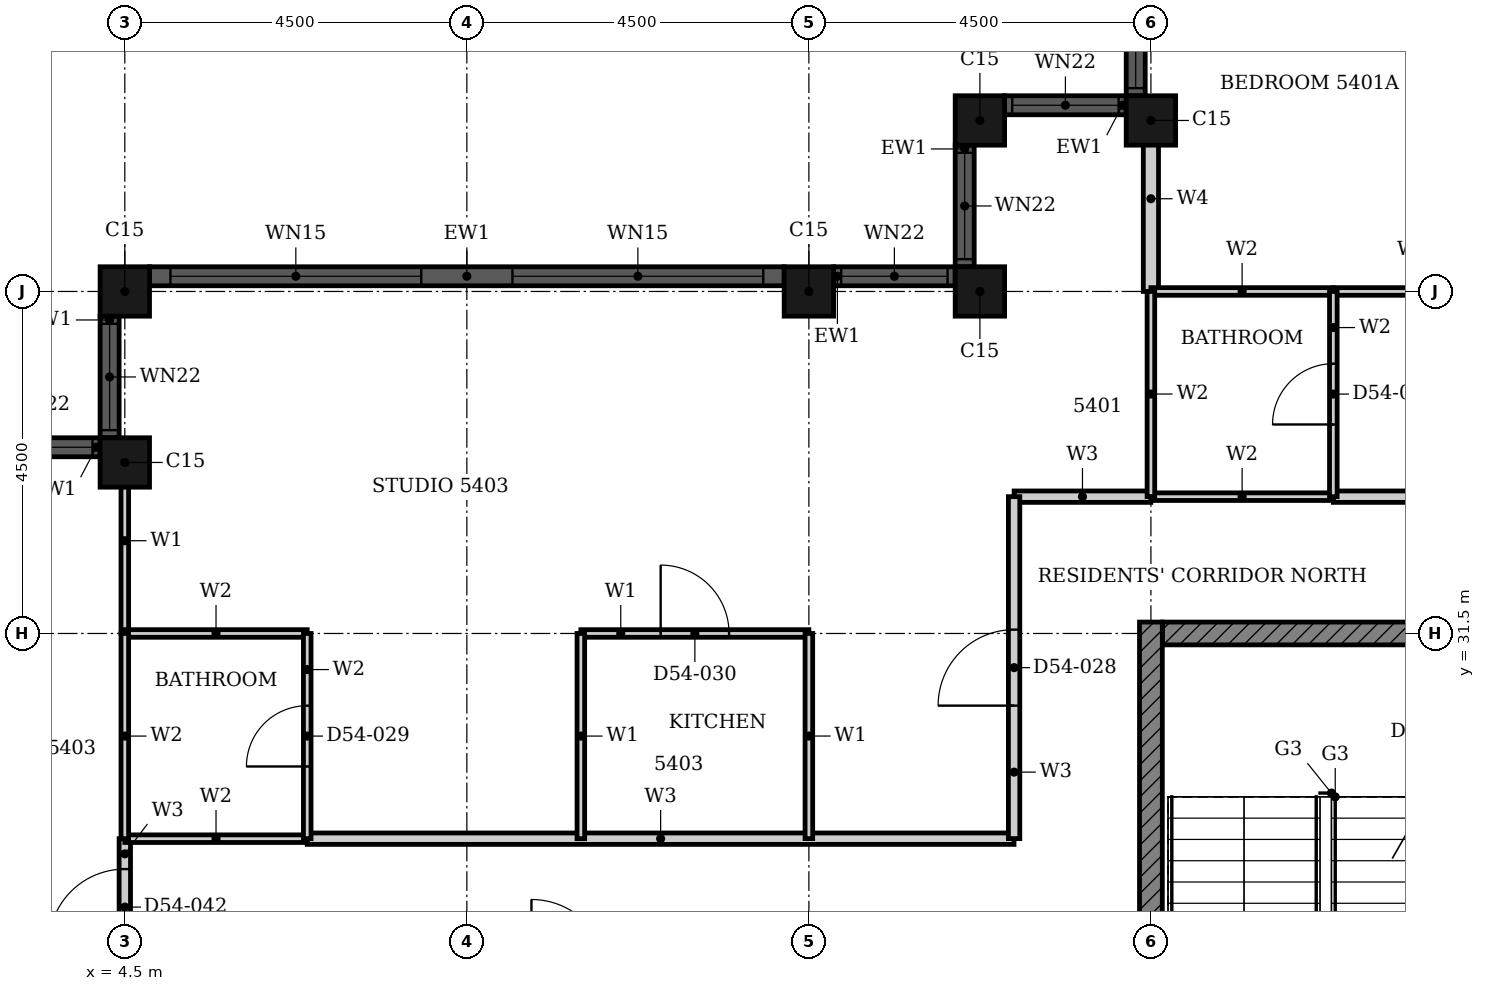
"""IFC4 building model, lengths in metres.
Left out: names, types, materials, properties, quantities, classifications, styles, units other than length and angle.
Written with IfcOpenShell. Run it as: python <this file> out.ifc"""

import sys

from ifc_helpers import new_model, si_unit, direction, frame, frame_2d, origin, origin_2d, place, context, subcontext, project, spatial, rectangle, hollow_rectangle, extrude, element, fill, save


model = new_model("IFC4")
c1 = context("Model", 3, precision=1e-05, world=origin(), true_north=direction((0.0, 1.0)))
c2 = subcontext(c1, "Body", "Model", "MODEL_VIEW")
j1 = project(units=[si_unit("LENGTHUNIT", "METRE"), si_unit("PLANEANGLEUNIT", "RADIAN")], contexts=[c1])
p1 = place(None, origin())
s1 = spatial("IfcSite", under=j1, at=p1, CompositionType="ELEMENT")
p2 = place(p1, origin())
s2 = spatial("IfcBuilding", under=s1, at=p2, CompositionType="ELEMENT")
p3 = place(p2, frame((0.0, 0.0, 214.6)))
s3 = spatial("IfcBuildingStorey", under=s2, at=p3, CompositionType="ELEMENT", Elevation=214.6)
for number, where, z_axis, x_axis in (
    (1, (18.0, 38.25, 0.0), (0.0, 0.0, 1.0), (1.0, 0.0, 0.0)),
    (2, (15.75, 38.25, 0.0), (0.0, 0.0, 1.0), (1.0, 0.0, 0.0)),
    (3, (15.75, 36.0, 0.0), (0.0, 0.0, 1.0), (1.0, 0.0, 0.0)),
    (4, (13.5, 36.0, 0.0), (0.0, 0.0, 1.0), (1.0, 0.0, 0.0)),
    (5, (4.5, 36.0, 0.0), (0.0, 0.0, 1.0), (1.0, 0.0, 0.0)),
    (6, (4.5, 33.75, 0.0), (0.0, 0.0, 1.0), (1.0, 0.0, 0.0)),
):
    element("IfcColumn", number, at=place(p3, frame(where, z_axis=z_axis, x_axis=x_axis)), inside=s3, PredefinedType="COLUMN", context=c2, shape_type="SweptSolid", body=[
        extrude(hollow_rectangle(XDim=0.65, YDim=0.65, WallThickness=0.021, at=origin_2d()), origin(), (0.0, 0.0, 1.0), 3.7),
    ])
p4 = place(p3, frame((17.8, 40.175, 0.0), z_axis=(0.0, 0.0, 1.0), x_axis=(0.0, -1.0, 0.0)))
e7 = element("IfcWall", 7, at=p4, inside=s3, PredefinedType="SOLIDWALL", context=c2, shape_type="SweptSolid", body=[
    extrude(rectangle(XDim=1.6, YDim=0.25, at=frame_2d((0.8, 0.0))), origin(), (0.0, 0.0, 1.0), 3.7),
])
p5 = place(p4, frame((0.1, 0.0, 0.9)))
e8 = element("IfcOpeningElement", 8, at=p5, cuts=e7, PredefinedType="OPENING", context=c2, shape_type="SweptSolid", body=[
    extrude(rectangle(XDim=1.4, YDim=1.85, at=frame_2d((0.7, 0.925))), frame((0.0, 0.135, 0.0), z_axis=(0.0, -1.0, 0.0), x_axis=(1.0, 0.0, 0.0)), (0.0, 0.0, 1.0), 0.27),
])
p6 = place(p3, frame((17.675, 38.45, 0.0), z_axis=(0.0, 0.0, 1.0), x_axis=(-1.0, 0.0, 0.0)))
e9 = element("IfcWall", 9, at=p6, inside=s3, PredefinedType="SOLIDWALL", context=c2, shape_type="SweptSolid", body=[
    extrude(rectangle(XDim=1.6, YDim=0.25, at=frame_2d((0.8, 0.0))), origin(), (0.0, 0.0, 1.0), 3.7),
])
p7 = place(p6, frame((0.1, 0.0, 0.9)))
e10 = element("IfcOpeningElement", 10, at=p7, cuts=e9, PredefinedType="OPENING", context=c2, shape_type="SweptSolid", body=[
    extrude(rectangle(XDim=1.4, YDim=1.85, at=frame_2d((0.7, 0.925))), frame((0.0, 0.135, 0.0), z_axis=(0.0, -1.0, 0.0), x_axis=(1.0, 0.0, 0.0)), (0.0, 0.0, 1.0), 0.27),
])
p8 = place(p3, frame((15.55, 37.925, 0.0), z_axis=(0.0, 0.0, 1.0), x_axis=(0.0, -1.0, 0.0)))
e11 = element("IfcWall", 11, at=p8, inside=s3, PredefinedType="SOLIDWALL", context=c2, shape_type="SweptSolid", body=[
    extrude(rectangle(XDim=1.6, YDim=0.25, at=frame_2d((0.8, 0.0))), origin(), (0.0, 0.0, 1.0), 3.7),
])
p9 = place(p8, frame((0.1, 0.0, 0.9)))
e12 = element("IfcOpeningElement", 12, at=p9, cuts=e11, PredefinedType="OPENING", context=c2, shape_type="SweptSolid", body=[
    extrude(rectangle(XDim=1.4, YDim=1.85, at=frame_2d((0.7, 0.925))), frame((0.0, 0.135, 0.0), z_axis=(0.0, -1.0, 0.0), x_axis=(1.0, 0.0, 0.0)), (0.0, 0.0, 1.0), 0.27),
])
p10 = place(p3, frame((15.425, 36.2, 0.0), z_axis=(0.0, 0.0, 1.0), x_axis=(-1.0, 0.0, 0.0)))
e13 = element("IfcWall", 13, at=p10, inside=s3, PredefinedType="SOLIDWALL", context=c2, shape_type="SweptSolid", body=[
    extrude(rectangle(XDim=1.6, YDim=0.25, at=frame_2d((0.8, 0.0))), origin(), (0.0, 0.0, 1.0), 3.7),
])
p11 = place(p10, frame((0.1, 0.0, 0.9)))
e14 = element("IfcOpeningElement", 14, at=p11, cuts=e13, PredefinedType="OPENING", context=c2, shape_type="SweptSolid", body=[
    extrude(rectangle(XDim=1.4, YDim=1.85, at=frame_2d((0.7, 0.925))), frame((0.0, 0.135, 0.0), z_axis=(0.0, -1.0, 0.0), x_axis=(1.0, 0.0, 0.0)), (0.0, 0.0, 1.0), 0.27),
])
p12 = place(p3, frame((13.175, 36.2, 0.0), z_axis=(0.0, 0.0, 1.0), x_axis=(-1.0, 0.0, 0.0)))
e15 = element("IfcWall", 15, at=p12, inside=s3, PredefinedType="SOLIDWALL", context=c2, shape_type="SweptSolid", body=[
    extrude(rectangle(XDim=8.35, YDim=0.25, at=frame_2d((4.175, 0.0))), origin(), (0.0, 0.0, 1.0), 3.7),
])
p13 = place(p12, frame((0.275, 0.0, 0.45)))
e16 = element("IfcOpeningElement", 16, at=p13, cuts=e15, PredefinedType="OPENING", context=c2, shape_type="SweptSolid", body=[
    extrude(rectangle(XDim=3.3, YDim=2.3, at=frame_2d((1.65, 1.15))), frame((0.0, 0.135, 0.0), z_axis=(0.0, -1.0, 0.0), x_axis=(1.0, 0.0, 0.0)), (0.0, 0.0, 1.0), 0.27),
])
p14 = place(p12, frame((4.775, 0.0, 0.45)))
e17 = element("IfcOpeningElement", 17, at=p14, cuts=e15, PredefinedType="OPENING", context=c2, shape_type="SweptSolid", body=[
    extrude(rectangle(XDim=3.3, YDim=2.3, at=frame_2d((1.65, 1.15))), frame((0.0, 0.135, 0.0), z_axis=(0.0, -1.0, 0.0), x_axis=(1.0, 0.0, 0.0)), (0.0, 0.0, 1.0), 0.27),
])
p15 = place(p3, frame((4.3, 35.675, 0.0), z_axis=(0.0, 0.0, 1.0), x_axis=(0.0, -1.0, 0.0)))
e18 = element("IfcWall", 18, at=p15, inside=s3, PredefinedType="SOLIDWALL", context=c2, shape_type="SweptSolid", body=[
    extrude(rectangle(XDim=1.6, YDim=0.25, at=frame_2d((0.8, 0.0))), origin(), (0.0, 0.0, 1.0), 3.7),
])
p16 = place(p15, frame((0.1, 0.0, 0.9)))
e19 = element("IfcOpeningElement", 19, at=p16, cuts=e18, PredefinedType="OPENING", context=c2, shape_type="SweptSolid", body=[
    extrude(rectangle(XDim=1.4, YDim=1.85, at=frame_2d((0.7, 0.925))), frame((0.0, 0.135, 0.0), z_axis=(0.0, -1.0, 0.0), x_axis=(1.0, 0.0, 0.0)), (0.0, 0.0, 1.0), 0.27),
])
p17 = place(p3, frame((4.175, 33.95, 0.0), z_axis=(0.0, 0.0, 1.0), x_axis=(-1.0, 0.0, 0.0)))
e20 = element("IfcWall", 20, at=p17, inside=s3, PredefinedType="SOLIDWALL", context=c2, shape_type="SweptSolid", body=[
    extrude(rectangle(XDim=1.6, YDim=0.25, at=frame_2d((0.8, 0.0))), origin(), (0.0, 0.0, 1.0), 3.7),
])
p18 = place(p17, frame((0.1, 0.0, 0.9)))
e21 = element("IfcOpeningElement", 21, at=p18, cuts=e20, PredefinedType="OPENING", context=c2, shape_type="SweptSolid", body=[
    extrude(rectangle(XDim=1.4, YDim=1.85, at=frame_2d((0.7, 0.925))), frame((0.0, 0.135, 0.0), z_axis=(0.0, -1.0, 0.0), x_axis=(1.0, 0.0, 0.0)), (0.0, 0.0, 1.0), 0.27),
])
p19 = place(p3, frame((18.15, 31.5, 0.0), z_axis=(0.0, 0.0, 1.0), x_axis=(1.0, 0.0, 0.0)))
e22 = element("IfcWall", 22, at=p19, inside=s3, PredefinedType="SHEAR", context=c2, shape_type="SweptSolid", body=[
    extrude(rectangle(XDim=9.368, YDim=0.3, at=frame_2d((4.684, 0.0))), origin(), (0.0, 0.0, 1.0), 3.4),
])
p20 = place(p19, frame((4.736, 0.0, 0.0)))
e23 = element("IfcOpeningElement", 23, at=p20, cuts=e22, PredefinedType="OPENING", context=c2, shape_type="SweptSolid", body=[
    extrude(rectangle(XDim=1.8, YDim=2.1, at=frame_2d((0.9, 1.05))), frame((0.0, 0.16, 0.0), z_axis=(0.0, -1.0, 0.0), x_axis=(1.0, 0.0, 0.0)), (0.0, 0.0, 1.0), 0.32),
])
p21 = place(p3, frame((18.0, 22.35, 0.0), z_axis=(0.0, 0.0, 1.0), x_axis=(0.0, 1.0, 0.0)))
e24 = element("IfcWall", 24, at=p21, inside=s3, PredefinedType="SHEAR", context=c2, shape_type="SweptSolid", body=[
    extrude(rectangle(XDim=9.3, YDim=0.3, at=frame_2d((4.65, 0.0))), origin(), (0.0, 0.0, 1.0), 3.4),
])
p22 = place(p3, frame((6.9, 28.8, 0.0), z_axis=(0.0, 0.0, 1.0), x_axis=(1.0, 0.0, 0.0)))
e25 = element("IfcWall", 25, at=p22, inside=s3, PredefinedType="PARTITIONING", context=c2, shape_type="SweptSolid", body=[
    extrude(rectangle(XDim=9.299, YDim=0.15, at=frame_2d((4.649, 0.0))), origin(), (0.0, 0.0, 1.0), 3.4),
])
p23 = place(p3, frame((20.4, 33.3, 0.0), z_axis=(0.0, 0.0, 1.0), x_axis=(1.0, 0.0, 0.0)))
e26 = element("IfcWall", 26, at=p23, inside=s3, PredefinedType="PARTITIONING", context=c2, shape_type="SweptSolid", body=[
    extrude(rectangle(XDim=11.1, YDim=0.15, at=frame_2d((5.55, 0.0))), origin(), (0.0, 0.0, 1.0), 3.4),
])
p24 = place(p23, frame((1.6, 0.0, 0.0)))
e27 = element("IfcOpeningElement", 27, at=p24, cuts=e26, PredefinedType="OPENING", context=c2, shape_type="SweptSolid", body=[
    extrude(rectangle(XDim=1.0, YDim=2.2, at=frame_2d((0.5, 1.1))), frame((0.0, 0.085, 0.0), z_axis=(0.0, -1.0, 0.0), x_axis=(1.0, 0.0, 0.0)), (0.0, 0.0, 1.0), 0.17),
])
p25 = place(p3, frame((16.2, 33.3, 0.0), z_axis=(0.0, 0.0, 1.0), x_axis=(1.0, 0.0, 0.0)))
e28 = element("IfcWall", 28, at=p25, inside=s3, PredefinedType="PARTITIONING", context=c2, shape_type="SweptSolid", body=[
    extrude(rectangle(XDim=1.799, YDim=0.15, at=frame_2d((0.899, 0.0))), origin(), (0.0, 0.0, 1.0), 3.4),
])
p26 = place(p3, frame((16.2, 28.801, 0.0), z_axis=(0.0, 0.0, 1.0), x_axis=(0.0, 1.0, 0.0)))
e29 = element("IfcWall", 29, at=p26, inside=s3, PredefinedType="PARTITIONING", context=c2, shape_type="SweptSolid", body=[
    extrude(rectangle(XDim=4.499, YDim=0.15, at=frame_2d((2.25, 0.0))), origin(), (0.0, 0.0, 1.0), 3.4),
])
p27 = place(p26, frame((1.75, 0.0, 0.0)))
e30 = element("IfcOpeningElement", 30, at=p27, cuts=e29, PredefinedType="OPENING", context=c2, shape_type="SweptSolid", body=[
    extrude(rectangle(XDim=1.0, YDim=2.2, at=frame_2d((0.5, 1.1))), frame((0.0, 0.085, 0.0), z_axis=(0.0, -1.0, 0.0), x_axis=(1.0, 0.0, 0.0)), (0.0, 0.0, 1.0), 0.17),
])
p28 = place(p3, frame((4.5, 27.0, 0.0), z_axis=(0.0, 0.0, 1.0), x_axis=(0.0, 1.0, 0.0)))
e31 = element("IfcWall", 31, at=p28, inside=s3, PredefinedType="PARTITIONING", context=c2, shape_type="SweptSolid", body=[
    extrude(rectangle(XDim=1.8, YDim=0.15, at=frame_2d((0.9, 0.0))), origin(), (0.0, 0.0, 1.0), 3.4),
])
p29 = place(p28, frame((0.4, 0.0, 0.0)))
e32 = element("IfcOpeningElement", 32, at=p29, cuts=e31, PredefinedType="OPENING", context=c2, shape_type="SweptSolid", body=[
    extrude(rectangle(XDim=1.0, YDim=2.1, at=frame_2d((0.5, 1.05))), frame((0.0, 0.085, 0.0), z_axis=(0.0, -1.0, 0.0), x_axis=(1.0, 0.0, 0.0)), (0.0, 0.0, 1.0), 0.17),
])
p30 = place(p3, frame((10.5, 31.5, 0.0), z_axis=(0.0, 0.0, 1.0), x_axis=(1.0, 0.0, 0.0)))
e33 = element("IfcWall", 33, at=p30, inside=s3, PredefinedType="PARTITIONING", context=c2, shape_type="SweptSolid", body=[
    extrude(rectangle(XDim=3.0, YDim=0.1, at=frame_2d((1.5, 0.0))), origin(), (0.0, 0.0, 1.0), 2.68),
])
p31 = place(p30, frame((1.05, 0.0, 0.0)))
e34 = element("IfcOpeningElement", 34, at=p31, cuts=e33, PredefinedType="OPENING", context=c2, shape_type="SweptSolid", body=[
    extrude(rectangle(XDim=0.9, YDim=2.1, at=frame_2d((0.45, 1.05))), frame((0.0, 0.06, 0.0), z_axis=(0.0, -1.0, 0.0), x_axis=(1.0, 0.0, 0.0)), (0.0, 0.0, 1.0), 0.12),
])
p32 = place(p3, frame((20.4, 36.0, 0.0), z_axis=(0.0, 0.0, 1.0), x_axis=(1.0, 0.0, 0.0)))
e35 = element("IfcWall", 35, at=p32, inside=s3, PredefinedType="PARTITIONING", context=c2, shape_type="SweptSolid", body=[
    extrude(rectangle(XDim=2.1, YDim=0.1, at=frame_2d((1.05, 0.0))), origin(), (0.0, 0.0, 1.0), 3.4),
])
p33 = place(p3, frame((10.5, 28.8, 0.0), z_axis=(0.0, 0.0, 1.0), x_axis=(0.0, 1.0, 0.0)))
e36 = element("IfcWall", 36, at=p33, inside=s3, PredefinedType="PARTITIONING", context=c2, shape_type="SweptSolid", body=[
    extrude(rectangle(XDim=2.7, YDim=0.1, at=frame_2d((1.35, 0.0))), origin(), (0.0, 0.0, 1.0), 3.4),
])
p34 = place(p3, frame((13.5, 28.801, 0.0), z_axis=(0.0, 0.0, 1.0), x_axis=(0.0, 1.0, 0.0)))
e37 = element("IfcWall", 37, at=p34, inside=s3, PredefinedType="PARTITIONING", context=c2, shape_type="SweptSolid", body=[
    extrude(rectangle(XDim=2.699, YDim=0.1, at=frame_2d((1.35, 0.0))), origin(), (0.0, 0.0, 1.0), 2.48),
])
p35 = place(p3, frame((4.5, 31.501, 0.0), z_axis=(0.0, 0.0, 1.0), x_axis=(0.0, 1.0, 0.0)))
e38 = element("IfcWall", 38, at=p35, inside=s3, PredefinedType="PARTITIONING", context=c2, shape_type="SweptSolid", body=[
    extrude(rectangle(XDim=2.439, YDim=0.1, at=frame_2d((1.219, 0.0))), origin(), (0.0, 0.0, 1.0), 3.4),
])
p36 = place(p3, frame((18.0, 36.0, 0.0), z_axis=(0.0, 0.0, 1.0), x_axis=(0.0, 1.0, 0.0)))
e39 = element("IfcWall", 39, at=p36, inside=s3, PredefinedType="PARTITIONING", context=c2, shape_type="SweptSolid", body=[
    extrude(rectangle(XDim=2.44, YDim=0.2, at=frame_2d((1.22, 0.0))), origin(), (0.0, 0.0, 1.0), 3.4),
])
p37 = place(p3, frame((4.5, 28.8, 0.0), z_axis=(0.0, 0.0, 1.0), x_axis=(1.0, 0.0, 0.0)))
e40 = element("IfcWall", 40, at=p37, inside=s3, PredefinedType="PARTITIONING", context=c2, shape_type="SweptSolid", body=[
    extrude(rectangle(XDim=2.4, YDim=0.1, at=frame_2d((1.2, 0.0))), origin(), (0.0, 0.0, 1.0), 3.4),
])
p38 = place(p3, frame((4.5, 31.5, 0.0), z_axis=(0.0, 0.0, 1.0), x_axis=(1.0, 0.0, 0.0)))
e41 = element("IfcWall", 41, at=p38, inside=s3, PredefinedType="PARTITIONING", context=c2, shape_type="SweptSolid", body=[
    extrude(rectangle(XDim=2.4, YDim=0.1, at=frame_2d((1.2, 0.0))), origin(), (0.0, 0.0, 1.0), 2.68),
])
for number, where, z_axis, x_axis in (
    (42, (18.0, 33.3, 0.0), (0.0, 0.0, 1.0), (1.0, 0.0, 0.0)),
    (43, (18.0, 36.0, 0.0), (0.0, 0.0, 1.0), (1.0, 0.0, 0.0)),
):
    element("IfcWall", number, at=place(p3, frame(where, z_axis=z_axis, x_axis=x_axis)), inside=s3, PredefinedType="PARTITIONING", context=c2, shape_type="SweptSolid", body=[
        extrude(rectangle(XDim=2.4, YDim=0.1, at=frame_2d((1.2, 0.0))), origin(), (0.0, 0.0, 1.0), 3.4),
    ])
p39 = place(p3, frame((18.0, 33.301, 0.0), z_axis=(0.0, 0.0, 1.0), x_axis=(0.0, 1.0, 0.0)))
e44 = element("IfcWall", 44, at=p39, inside=s3, PredefinedType="PARTITIONING", context=c2, shape_type="SweptSolid", body=[
    extrude(rectangle(XDim=2.699, YDim=0.1, at=frame_2d((1.35, 0.0))), origin(), (0.0, 0.0, 1.0), 3.4),
])
p40 = place(p3, frame((20.4, 33.3, 0.0), z_axis=(0.0, 0.0, 1.0), x_axis=(0.0, 1.0, 0.0)))
e45 = element("IfcWall", 45, at=p40, inside=s3, PredefinedType="PARTITIONING", context=c2, shape_type="SweptSolid", body=[
    extrude(rectangle(XDim=2.7, YDim=0.1, at=frame_2d((1.35, 0.0))), origin(), (0.0, 0.0, 1.0), 3.4),
])
p41 = place(p40, frame((0.95, 0.0, 0.0)))
e46 = element("IfcOpeningElement", 46, at=p41, cuts=e45, PredefinedType="OPENING", context=c2, shape_type="SweptSolid", body=[
    extrude(rectangle(XDim=0.8, YDim=2.1, at=frame_2d((0.4, 1.05))), frame((0.0, 0.06, 0.0), z_axis=(0.0, -1.0, 0.0), x_axis=(1.0, 0.0, 0.0)), (0.0, 0.0, 1.0), 0.12),
])
p42 = place(p3, frame((4.5, 28.8, 0.0), z_axis=(0.0, 0.0, 1.0), x_axis=(0.0, 1.0, 0.0)))
e47 = element("IfcWall", 47, at=p42, inside=s3, PredefinedType="PARTITIONING", context=c2, shape_type="SweptSolid", body=[
    extrude(rectangle(XDim=2.7, YDim=0.1, at=frame_2d((1.35, 0.0))), origin(), (0.0, 0.0, 1.0), 3.4),
])
p43 = place(p3, frame((6.9, 28.8, 0.0), z_axis=(0.0, 0.0, 1.0), x_axis=(0.0, 1.0, 0.0)))
e48 = element("IfcWall", 48, at=p43, inside=s3, PredefinedType="PARTITIONING", context=c2, shape_type="SweptSolid", body=[
    extrude(rectangle(XDim=2.7, YDim=0.1, at=frame_2d((1.35, 0.0))), origin(), (0.0, 0.0, 1.0), 3.4),
])
p44 = place(p43, frame((0.95, 0.0, 0.0)))
e49 = element("IfcOpeningElement", 49, at=p44, cuts=e48, PredefinedType="OPENING", context=c2, shape_type="SweptSolid", body=[
    extrude(rectangle(XDim=0.8, YDim=2.1, at=frame_2d((0.4, 1.05))), frame((0.0, 0.06, 0.0), z_axis=(0.0, -1.0, 0.0), x_axis=(1.0, 0.0, 0.0)), (0.0, 0.0, 1.0), 0.12),
])
p45 = place(p5, origin())
e50 = element("IfcWindow", 50, at=p45, inside=s3, PartitioningType="SINGLE_PANEL", PredefinedType="WINDOW", context=c2, shape_type="SweptSolid", body=[
    extrude(rectangle(XDim=1.4, YDim=1.85, at=frame_2d((0.7, 0.925))), frame((0.0, 0.03, 0.0), z_axis=(0.0, -1.0, 0.0), x_axis=(1.0, 0.0, 0.0)), (0.0, 0.0, 1.0), 0.06),
])
fill(e8, e50)
p46 = place(p7, origin())
e51 = element("IfcWindow", 51, at=p46, inside=s3, PartitioningType="SINGLE_PANEL", PredefinedType="WINDOW", context=c2, shape_type="SweptSolid", body=[
    extrude(rectangle(XDim=1.4, YDim=1.85, at=frame_2d((0.7, 0.925))), frame((0.0, 0.03, 0.0), z_axis=(0.0, -1.0, 0.0), x_axis=(1.0, 0.0, 0.0)), (0.0, 0.0, 1.0), 0.06),
])
fill(e10, e51)
p47 = place(p9, origin())
e52 = element("IfcWindow", 52, at=p47, inside=s3, PartitioningType="SINGLE_PANEL", PredefinedType="WINDOW", context=c2, shape_type="SweptSolid", body=[
    extrude(rectangle(XDim=1.4, YDim=1.85, at=frame_2d((0.7, 0.925))), frame((0.0, 0.03, 0.0), z_axis=(0.0, -1.0, 0.0), x_axis=(1.0, 0.0, 0.0)), (0.0, 0.0, 1.0), 0.06),
])
fill(e12, e52)
p48 = place(p11, origin())
e53 = element("IfcWindow", 53, at=p48, inside=s3, PartitioningType="SINGLE_PANEL", PredefinedType="WINDOW", context=c2, shape_type="SweptSolid", body=[
    extrude(rectangle(XDim=1.4, YDim=1.85, at=frame_2d((0.7, 0.925))), frame((0.0, 0.03, 0.0), z_axis=(0.0, -1.0, 0.0), x_axis=(1.0, 0.0, 0.0)), (0.0, 0.0, 1.0), 0.06),
])
fill(e14, e53)
p49 = place(p13, origin())
e54 = element("IfcWindow", 54, at=p49, inside=s3, PartitioningType="SINGLE_PANEL", PredefinedType="WINDOW", context=c2, shape_type="SweptSolid", body=[
    extrude(rectangle(XDim=3.3, YDim=2.3, at=frame_2d((1.65, 1.15))), frame((0.0, 0.03, 0.0), z_axis=(0.0, -1.0, 0.0), x_axis=(1.0, 0.0, 0.0)), (0.0, 0.0, 1.0), 0.06),
])
fill(e16, e54)
p50 = place(p14, origin())
e55 = element("IfcWindow", 55, at=p50, inside=s3, PartitioningType="SINGLE_PANEL", PredefinedType="WINDOW", context=c2, shape_type="SweptSolid", body=[
    extrude(rectangle(XDim=3.3, YDim=2.3, at=frame_2d((1.65, 1.15))), frame((0.0, 0.03, 0.0), z_axis=(0.0, -1.0, 0.0), x_axis=(1.0, 0.0, 0.0)), (0.0, 0.0, 1.0), 0.06),
])
fill(e17, e55)
p51 = place(p16, origin())
e56 = element("IfcWindow", 56, at=p51, inside=s3, PartitioningType="SINGLE_PANEL", PredefinedType="WINDOW", context=c2, shape_type="SweptSolid", body=[
    extrude(rectangle(XDim=1.4, YDim=1.85, at=frame_2d((0.7, 0.925))), frame((0.0, 0.03, 0.0), z_axis=(0.0, -1.0, 0.0), x_axis=(1.0, 0.0, 0.0)), (0.0, 0.0, 1.0), 0.06),
])
fill(e19, e56)
p52 = place(p18, origin())
e57 = element("IfcWindow", 57, at=p52, inside=s3, PartitioningType="SINGLE_PANEL", PredefinedType="WINDOW", context=c2, shape_type="SweptSolid", body=[
    extrude(rectangle(XDim=1.4, YDim=1.85, at=frame_2d((0.7, 0.925))), frame((0.0, 0.03, 0.0), z_axis=(0.0, -1.0, 0.0), x_axis=(1.0, 0.0, 0.0)), (0.0, 0.0, 1.0), 0.06),
])
fill(e21, e57)
p53 = place(p41, origin())
e58 = element("IfcDoor", 58, at=p53, inside=s3, OperationType="SINGLE_SWING_RIGHT", PredefinedType="DOOR", context=c2, shape_type="SweptSolid", body=[
    extrude(rectangle(XDim=0.8, YDim=2.1, at=frame_2d((0.4, 1.05))), frame((0.0, 0.025, 0.0), z_axis=(0.0, -1.0, 0.0), x_axis=(1.0, 0.0, 0.0)), (0.0, 0.0, 1.0), 0.05),
])
fill(e46, e58)
p54 = place(p27, origin())
e59 = element("IfcDoor", 59, at=p54, inside=s3, OperationType="SINGLE_SWING_RIGHT", PredefinedType="DOOR", context=c2, shape_type="SweptSolid", body=[
    extrude(rectangle(XDim=1.0, YDim=2.2, at=frame_2d((0.5, 1.1))), frame((0.0, 0.025, 0.0), z_axis=(0.0, -1.0, 0.0), x_axis=(1.0, 0.0, 0.0)), (0.0, 0.0, 1.0), 0.05),
])
fill(e30, e59)
p55 = place(p44, origin())
e60 = element("IfcDoor", 60, at=p55, inside=s3, OperationType="SINGLE_SWING_RIGHT", PredefinedType="DOOR", context=c2, shape_type="SweptSolid", body=[
    extrude(rectangle(XDim=0.8, YDim=2.1, at=frame_2d((0.4, 1.05))), frame((0.0, 0.025, 0.0), z_axis=(0.0, -1.0, 0.0), x_axis=(1.0, 0.0, 0.0)), (0.0, 0.0, 1.0), 0.05),
])
fill(e49, e60)
p56 = place(p31, origin())
e61 = element("IfcDoor", 61, at=p56, inside=s3, OperationType="SINGLE_SWING_RIGHT", PredefinedType="DOOR", context=c2, shape_type="SweptSolid", body=[
    extrude(rectangle(XDim=0.9, YDim=2.1, at=frame_2d((0.45, 1.05))), frame((0.0, 0.025, 0.0), z_axis=(0.0, -1.0, 0.0), x_axis=(1.0, 0.0, 0.0)), (0.0, 0.0, 1.0), 0.05),
])
fill(e34, e61)
p57 = place(p29, origin())
e62 = element("IfcDoor", 62, at=p57, inside=s3, OperationType="SINGLE_SWING_LEFT", PredefinedType="DOOR", context=c2, shape_type="SweptSolid", body=[
    extrude(rectangle(XDim=1.0, YDim=2.1, at=frame_2d((0.5, 1.05))), frame((0.0, 0.025, 0.0), z_axis=(0.0, -1.0, 0.0), x_axis=(1.0, 0.0, 0.0)), (0.0, 0.0, 1.0), 0.05),
])
fill(e32, e62)
save(model, sys.argv[1])
